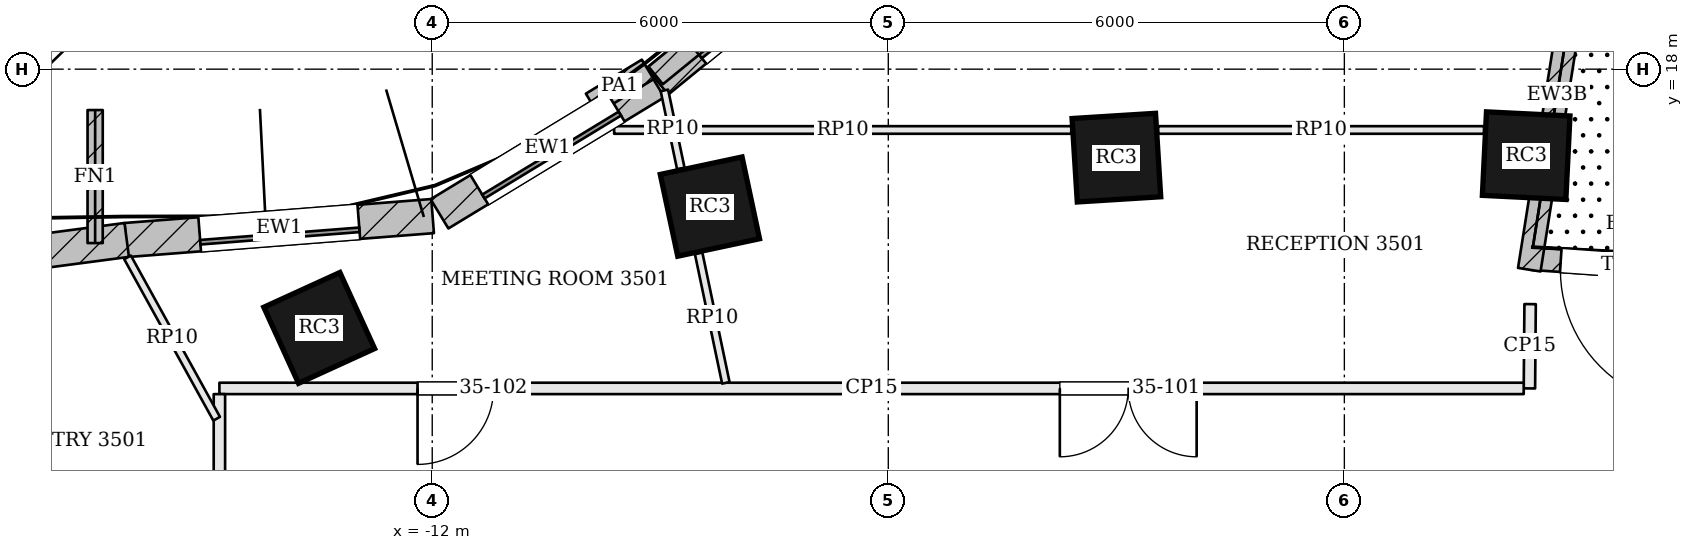
"""IFC4 building model, lengths in metres.
Left out: names, types, materials, properties, quantities, classifications, styles, units other than length and angle.
Written with IfcOpenShell. Run it as: python <this file> out.ifc"""

import sys

from ifc_helpers import new_model, si_unit, direction, frame, frame_2d, origin, origin_2d, place, context, subcontext, project, spatial, rectangle, extrude, element, fill, save


model = new_model("IFC4")
c1 = context("Model", 3, precision=1e-05, world=origin(), true_north=direction((0.0, 1.0)))
c2 = subcontext(c1, "Body", "Model", "MODEL_VIEW")
j1 = project(units=[si_unit("LENGTHUNIT", "METRE"), si_unit("PLANEANGLEUNIT", "RADIAN")], contexts=[c1])
p1 = place(None, origin())
s1 = spatial("IfcSite", under=j1, at=p1, CompositionType="ELEMENT")
p2 = place(p1, origin())
s2 = spatial("IfcBuilding", under=s1, at=p2, CompositionType="ELEMENT")
p3 = place(p2, frame((0.0, 0.0, 146.1)))
s3 = spatial("IfcBuildingStorey", under=s2, at=p3, CompositionType="ELEMENT", Elevation=146.1)
for number, where, z_axis, x_axis in (
    (1, (2.392, 16.862, 0.0), (0.0, 0.0, 1.0), (-0.999, 0.049, 0.0)),
    (2, (-2.999, 16.836, 0.0), (0.0, 0.0, 1.0), (-0.998, -0.062, 0.0)),
    (3, (-8.347, 16.192, 0.0), (0.0, 0.0, 1.0), (-0.978, -0.209, 0.0)),
    (4, (-13.487, 14.596, 0.0), (0.0, 0.0, 1.0), (-0.91, -0.415, 0.0)),
):
    element("IfcColumn", number, at=place(p3, frame(where, z_axis=z_axis, x_axis=x_axis)), inside=s3, PredefinedType="COLUMN", context=c2, shape_type="SweptSolid", body=[
        extrude(rectangle(XDim=1.1, YDim=1.1, at=origin_2d()), origin(), (0.0, 0.0, 1.0), 3.9),
    ])
p4 = place(p3, frame((5.02, 15.33, 0.0), z_axis=(0.0, 0.0, 1.0), x_axis=(-0.997573249966, 0.069624786905, 0.0)))
e5 = element("IfcWall", 5, at=p4, inside=s3, PredefinedType="SOLIDWALL", context=c2, shape_type="SweptSolid", body=[
    extrude(rectangle(XDim=2.556, YDim=0.3, at=frame_2d((1.278, 0.0))), origin(), (0.0, 0.0, 1.0), 3.7),
])
p5 = place(p4, frame((0.378, 0.0, 0.0)))
e6 = element("IfcOpeningElement", 6, at=p5, cuts=e5, PredefinedType="OPENING", context=c2, shape_type="SweptSolid", body=[
    extrude(rectangle(XDim=1.8, YDim=2.4, at=frame_2d((0.9, 1.2))), frame((0.0, 0.16, 0.0), z_axis=(0.0, -1.0, 0.0), x_axis=(1.0, 0.0, 0.0)), (0.0, 0.0, 1.0), 0.32),
])
p6 = place(p3, frame((-6.411, 19.983, 0.0), z_axis=(0.0, 0.0, 1.0), x_axis=(-0.774810240287, -0.632193871804, 0.0)))
e7 = element("IfcWall", 7, at=p6, inside=s3, PredefinedType="SOLIDWALL", context=c2, shape_type="SweptSolid", body=[
    extrude(rectangle(XDim=3.389, YDim=0.45, at=frame_2d((1.695, 0.0))), origin(), (0.0, 0.0, 1.0), 3.7),
])
p7 = place(p6, frame((0.645, 0.0, 0.9)))
e8 = element("IfcOpeningElement", 8, at=p7, cuts=e7, PredefinedType="OPENING", context=c2, shape_type="SweptSolid", body=[
    extrude(rectangle(XDim=2.1, YDim=2.3, at=frame_2d((1.05, 1.15))), frame((0.0, 0.235, 0.0), z_axis=(0.0, -1.0, 0.0), x_axis=(1.0, 0.0, 0.0)), (0.0, 0.0, 1.0), 0.47),
])
p8 = place(p3, frame((-9.063, 17.823, 0.0), z_axis=(0.0, 0.0, 1.0), x_axis=(-0.854622263029, -0.519250216693, 0.0)))
e9 = element("IfcWall", 9, at=p8, inside=s3, PredefinedType="SOLIDWALL", context=c2, shape_type="SweptSolid", body=[
    extrude(rectangle(XDim=3.325, YDim=0.45, at=frame_2d((1.662, 0.0))), origin(), (0.0, 0.0, 1.0), 3.7),
])
p9 = place(p8, frame((0.612, 0.0, 0.9)))
e10 = element("IfcOpeningElement", 10, at=p9, cuts=e9, PredefinedType="OPENING", context=c2, shape_type="SweptSolid", body=[
    extrude(rectangle(XDim=2.1, YDim=2.3, at=frame_2d((1.05, 1.15))), frame((0.0, 0.235, 0.0), z_axis=(0.0, -1.0, 0.0), x_axis=(1.0, 0.0, 0.0)), (0.0, 0.0, 1.0), 0.47),
])
p10 = place(p3, frame((-11.995, 16.067, 0.0), z_axis=(0.0, 0.0, 1.0), x_axis=(-0.996967993416, -0.077812724559, 0.0)))
e11 = element("IfcWall", 11, at=p10, inside=s3, PredefinedType="SOLIDWALL", context=c2, shape_type="SweptSolid", body=[
    extrude(rectangle(XDim=4.047, YDim=0.45, at=frame_2d((2.024, 0.0))), origin(), (0.0, 0.0, 1.0), 3.7),
])
p11 = place(p10, frame((0.974, 0.0, 0.9)))
e12 = element("IfcOpeningElement", 12, at=p11, cuts=e11, PredefinedType="OPENING", context=c2, shape_type="SweptSolid", body=[
    extrude(rectangle(XDim=2.1, YDim=2.3, at=frame_2d((1.05, 1.15))), frame((0.0, 0.235, 0.0), z_axis=(0.0, -1.0, 0.0), x_axis=(1.0, 0.0, 0.0)), (0.0, 0.0, 1.0), 0.47),
])
p12 = place(p3, frame((-16.019, 15.753, 0.0), z_axis=(0.0, 0.0, 1.0), x_axis=(-0.991409967396, -0.130790965086, 0.0)))
e13 = element("IfcWall", 13, at=p12, inside=s3, PredefinedType="SOLIDWALL", context=c2, shape_type="SweptSolid", body=[
    extrude(rectangle(XDim=5.068, YDim=0.45, at=frame_2d((2.534, 0.0))), origin(), (0.0, 0.0, 1.0), 3.7),
])
p13 = place(p12, frame((1.484, 0.0, 0.9)))
e14 = element("IfcOpeningElement", 14, at=p13, cuts=e13, PredefinedType="OPENING", context=c2, shape_type="SweptSolid", body=[
    extrude(rectangle(XDim=2.1, YDim=2.3, at=frame_2d((1.05, 1.15))), frame((0.0, 0.235, 0.0), z_axis=(0.0, -1.0, 0.0), x_axis=(1.0, 0.0, 0.0)), (0.0, 0.0, 1.0), 0.47),
])
p14 = place(p3, frame((-16.435, 15.712, 0.0), z_axis=(0.0, 0.0, 1.0), x_axis=(0.000279017846, 0.999999961075, 0.0)))
e15 = element("IfcWall", 15, at=p14, inside=s3, PredefinedType="SOLIDWALL", context=c2, shape_type="SweptSolid", body=[
    extrude(rectangle(XDim=1.75, YDim=0.2, at=frame_2d((0.875, 0.0))), origin(), (0.0, 0.0, 1.0), 3.7),
])
p15 = place(p3, frame((3.16, 19.949, 0.0), z_axis=(0.0, 0.0, 1.0), x_axis=(-0.156491629738, -0.987679284901, 0.0)))
e16 = element("IfcWall", 16, at=p15, inside=s3, PredefinedType="SOLIDWALL", context=c2, shape_type="SweptSolid", body=[
    extrude(rectangle(XDim=4.644, YDim=0.3, at=frame_2d((2.322, 0.0))), origin(), (0.0, 0.0, 1.0), 3.204),
])
p16 = place(p3, frame((-6.505, 20.003, 3.9), z_axis=(0.0, 0.0, 1.0), x_axis=(-0.774774389425, -0.632237807705, 0.0)))
e17 = element("IfcWall", 17, at=p16, inside=s3, PredefinedType="PARAPET", context=c2, shape_type="SweptSolid", body=[
    extrude(rectangle(XDim=3.299, YDim=0.3, at=frame_2d((1.649, 0.0))), origin(), (0.0, 0.0, 1.0), 1.1),
])
p17 = place(p3, frame((-9.164, 17.997, 3.9), z_axis=(0.0, 0.0, 1.0), x_axis=(-0.854630396294, -0.519236830098, 0.0)))
e18 = element("IfcWall", 18, at=p17, inside=s3, PredefinedType="PARAPET", context=c2, shape_type="SweptSolid", body=[
    extrude(rectangle(XDim=0.862, YDim=0.3, at=frame_2d((0.431, 0.0))), origin(), (0.0, 0.0, 1.0), 1.1),
])
p18 = place(p3, frame((2.444, 14.909, 0.0), z_axis=(0.0, 0.0, 1.0), x_axis=(-0.008145920826, -0.999966821437, 0.0)))
e19 = element("IfcWall", 19, at=p18, inside=s3, PredefinedType="PARTITIONING", context=c2, shape_type="SweptSolid", body=[
    extrude(rectangle(XDim=1.109, YDim=0.15, at=frame_2d((0.554, 0.0))), origin(), (0.0, 0.0, 1.0), 3.198),
])
p19 = place(p3, frame((2.36, 13.8, 0.0), z_axis=(0.0, 0.0, 1.0), x_axis=(-1.0, 0.0, 0.0)))
e20 = element("IfcWall", 20, at=p19, inside=s3, PredefinedType="PARTITIONING", context=c2, shape_type="SweptSolid", body=[
    extrude(rectangle(XDim=17.16, YDim=0.15, at=frame_2d((8.58, 0.0))), origin(), (0.0, 0.0, 1.0), 3.198),
])
p20 = place(p19, frame((4.303, 0.0, 0.0)))
e21 = element("IfcOpeningElement", 21, at=p20, cuts=e20, PredefinedType="OPENING", context=c2, shape_type="SweptSolid", body=[
    extrude(rectangle(XDim=1.8, YDim=2.1, at=frame_2d((0.9, 1.05))), frame((0.0, 0.085, 0.0), z_axis=(0.0, -1.0, 0.0), x_axis=(1.0, 0.0, 0.0)), (0.0, 0.0, 1.0), 0.17),
])
p21 = place(p19, frame((13.553, 0.0, 0.0)))
e22 = element("IfcOpeningElement", 22, at=p21, cuts=e20, PredefinedType="OPENING", context=c2, shape_type="SweptSolid", body=[
    extrude(rectangle(XDim=1.0, YDim=2.4, at=frame_2d((0.5, 1.2))), frame((0.0, 0.085, 0.0), z_axis=(0.0, -1.0, 0.0), x_axis=(1.0, 0.0, 0.0)), (0.0, 0.0, 1.0), 0.17),
])
p22 = place(p3, frame((-14.8, 13.725, 0.0), z_axis=(0.0, 0.0, 1.0), x_axis=(0.0, -1.0, 0.0)))
e23 = element("IfcWall", 23, at=p22, inside=s3, PredefinedType="PARTITIONING", context=c2, shape_type="SweptSolid", body=[
    extrude(rectangle(XDim=11.491, YDim=0.15, at=frame_2d((5.745, 0.0))), origin(), (0.0, 0.0, 1.0), 3.198),
])
p23 = place(p22, frame((2.45, 0.0, 0.0)))
e24 = element("IfcOpeningElement", 24, at=p23, cuts=e23, PredefinedType="OPENING", context=c2, shape_type="SweptSolid", body=[
    extrude(rectangle(XDim=1.0, YDim=2.1, at=frame_2d((0.5, 1.05))), frame((0.0, 0.085, 0.0), z_axis=(0.0, -1.0, 0.0), x_axis=(1.0, 0.0, 0.0)), (0.0, 0.0, 1.0), 0.17),
])
p24 = place(p22, frame((7.95, 0.0, 0.0)))
e25 = element("IfcOpeningElement", 25, at=p24, cuts=e23, PredefinedType="OPENING", context=c2, shape_type="SweptSolid", body=[
    extrude(rectangle(XDim=1.0, YDim=2.1, at=frame_2d((0.5, 1.05))), frame((0.0, 0.085, 0.0), z_axis=(0.0, -1.0, 0.0), x_axis=(1.0, 0.0, 0.0)), (0.0, 0.0, 1.0), 0.17),
])
p25 = place(p3, frame((-9.607, 17.2, 0.0), z_axis=(0.0, 0.0, 1.0), x_axis=(1.0, 0.0, 0.0)))
e26 = element("IfcWall", 26, at=p25, inside=s3, PredefinedType="PARTITIONING", context=c2, shape_type="SweptSolid", body=[
    extrude(rectangle(XDim=6.014, YDim=0.1, at=frame_2d((3.007, 0.0))), origin(), (0.0, 0.0, 1.0), 3.184),
])
p26 = place(p3, frame((-2.451, 17.2, 0.0), z_axis=(0.0, 0.0, 1.0), x_axis=(1.0, 0.0, 0.0)))
e27 = element("IfcWall", 27, at=p26, inside=s3, PredefinedType="PARTITIONING", context=c2, shape_type="SweptSolid", body=[
    extrude(rectangle(XDim=4.289, YDim=0.1, at=frame_2d((2.144, 0.0))), origin(), (0.0, 0.0, 1.0), 3.184),
])
p27 = place(p3, frame((-8.137, 13.873, 0.0), z_axis=(0.0, 0.0, 1.0), x_axis=(-0.205544091297, 0.978647856245, 0.0)))
e28 = element("IfcWall", 28, at=p27, inside=s3, PredefinedType="PARTITIONING", context=c2, shape_type="SweptSolid", body=[
    extrude(rectangle(XDim=1.741, YDim=0.1, at=frame_2d((0.871, 0.0))), origin(), (0.0, 0.0, 1.0), 3.184),
])
p28 = place(p3, frame((-8.73, 16.693, 0.0), z_axis=(0.0, 0.0, 1.0), x_axis=(-0.2055417304, 0.978648352098, 0.0)))
e29 = element("IfcWall", 29, at=p28, inside=s3, PredefinedType="PARTITIONING", context=c2, shape_type="SweptSolid", body=[
    extrude(rectangle(XDim=1.05, YDim=0.1, at=frame_2d((0.525, 0.0))), origin(), (0.0, 0.0, 1.0), 3.184),
])
p29 = place(p3, frame((-14.836, 13.401, 0.0), z_axis=(0.0, 0.0, 1.0), x_axis=(-0.483487187132, 0.875351437926, 0.0)))
e30 = element("IfcWall", 30, at=p29, inside=s3, PredefinedType="PARTITIONING", context=c2, shape_type="SweptSolid", body=[
    extrude(rectangle(XDim=2.425, YDim=0.1, at=frame_2d((1.212, 0.0))), origin(), (0.0, 0.0, 1.0), 3.184),
])
p30 = place(p5, origin())
e31 = element("IfcDoor", 31, at=p30, inside=s3, OperationType="DOUBLE_DOOR_DOUBLE_SWING", PredefinedType="DOOR", context=c2, shape_type="SweptSolid", body=[
    extrude(rectangle(XDim=1.8, YDim=2.4, at=frame_2d((0.9, 1.2))), frame((0.0, 0.025, 0.0), z_axis=(0.0, -1.0, 0.0), x_axis=(1.0, 0.0, 0.0)), (0.0, 0.0, 1.0), 0.05),
])
fill(e6, e31)
p31 = place(p7, origin())
e32 = element("IfcWindow", 32, at=p31, inside=s3, PartitioningType="SINGLE_PANEL", PredefinedType="WINDOW", context=c2, shape_type="SweptSolid", body=[
    extrude(rectangle(XDim=2.1, YDim=2.3, at=frame_2d((1.05, 1.15))), frame((0.0, 0.135, 0.0), z_axis=(0.0, -1.0, 0.0), x_axis=(1.0, 0.0, 0.0)), (0.0, 0.0, 1.0), 0.06),
])
fill(e8, e32)
p32 = place(p9, origin())
e33 = element("IfcWindow", 33, at=p32, inside=s3, PartitioningType="SINGLE_PANEL", PredefinedType="WINDOW", context=c2, shape_type="SweptSolid", body=[
    extrude(rectangle(XDim=2.1, YDim=2.3, at=frame_2d((1.05, 1.15))), frame((0.0, 0.135, 0.0), z_axis=(0.0, -1.0, 0.0), x_axis=(1.0, 0.0, 0.0)), (0.0, 0.0, 1.0), 0.06),
])
fill(e10, e33)
p33 = place(p11, origin())
e34 = element("IfcWindow", 34, at=p33, inside=s3, PartitioningType="SINGLE_PANEL", PredefinedType="WINDOW", context=c2, shape_type="SweptSolid", body=[
    extrude(rectangle(XDim=2.1, YDim=2.3, at=frame_2d((1.05, 1.15))), frame((0.0, 0.135, 0.0), z_axis=(0.0, -1.0, 0.0), x_axis=(1.0, 0.0, 0.0)), (0.0, 0.0, 1.0), 0.06),
])
fill(e12, e34)
p34 = place(p20, origin())
e35 = element("IfcDoor", 35, at=p34, inside=s3, OperationType="DOUBLE_DOOR_SINGLE_SWING", PredefinedType="DOOR", context=c2, shape_type="SweptSolid", body=[
    extrude(rectangle(XDim=1.8, YDim=2.1, at=frame_2d((0.9, 1.05))), frame((0.0, 0.025, 0.0), z_axis=(0.0, -1.0, 0.0), x_axis=(1.0, 0.0, 0.0)), (0.0, 0.0, 1.0), 0.05),
])
fill(e21, e35)
p35 = place(p21, origin())
e36 = element("IfcDoor", 36, at=p35, inside=s3, OperationType="SINGLE_SWING_RIGHT", PredefinedType="DOOR", context=c2, shape_type="SweptSolid", body=[
    extrude(rectangle(XDim=1.0, YDim=2.4, at=frame_2d((0.5, 1.2))), frame((0.0, 0.025, 0.0), z_axis=(0.0, -1.0, 0.0), x_axis=(1.0, 0.0, 0.0)), (0.0, 0.0, 1.0), 0.05),
])
fill(e22, e36)
save(model, sys.argv[1])
